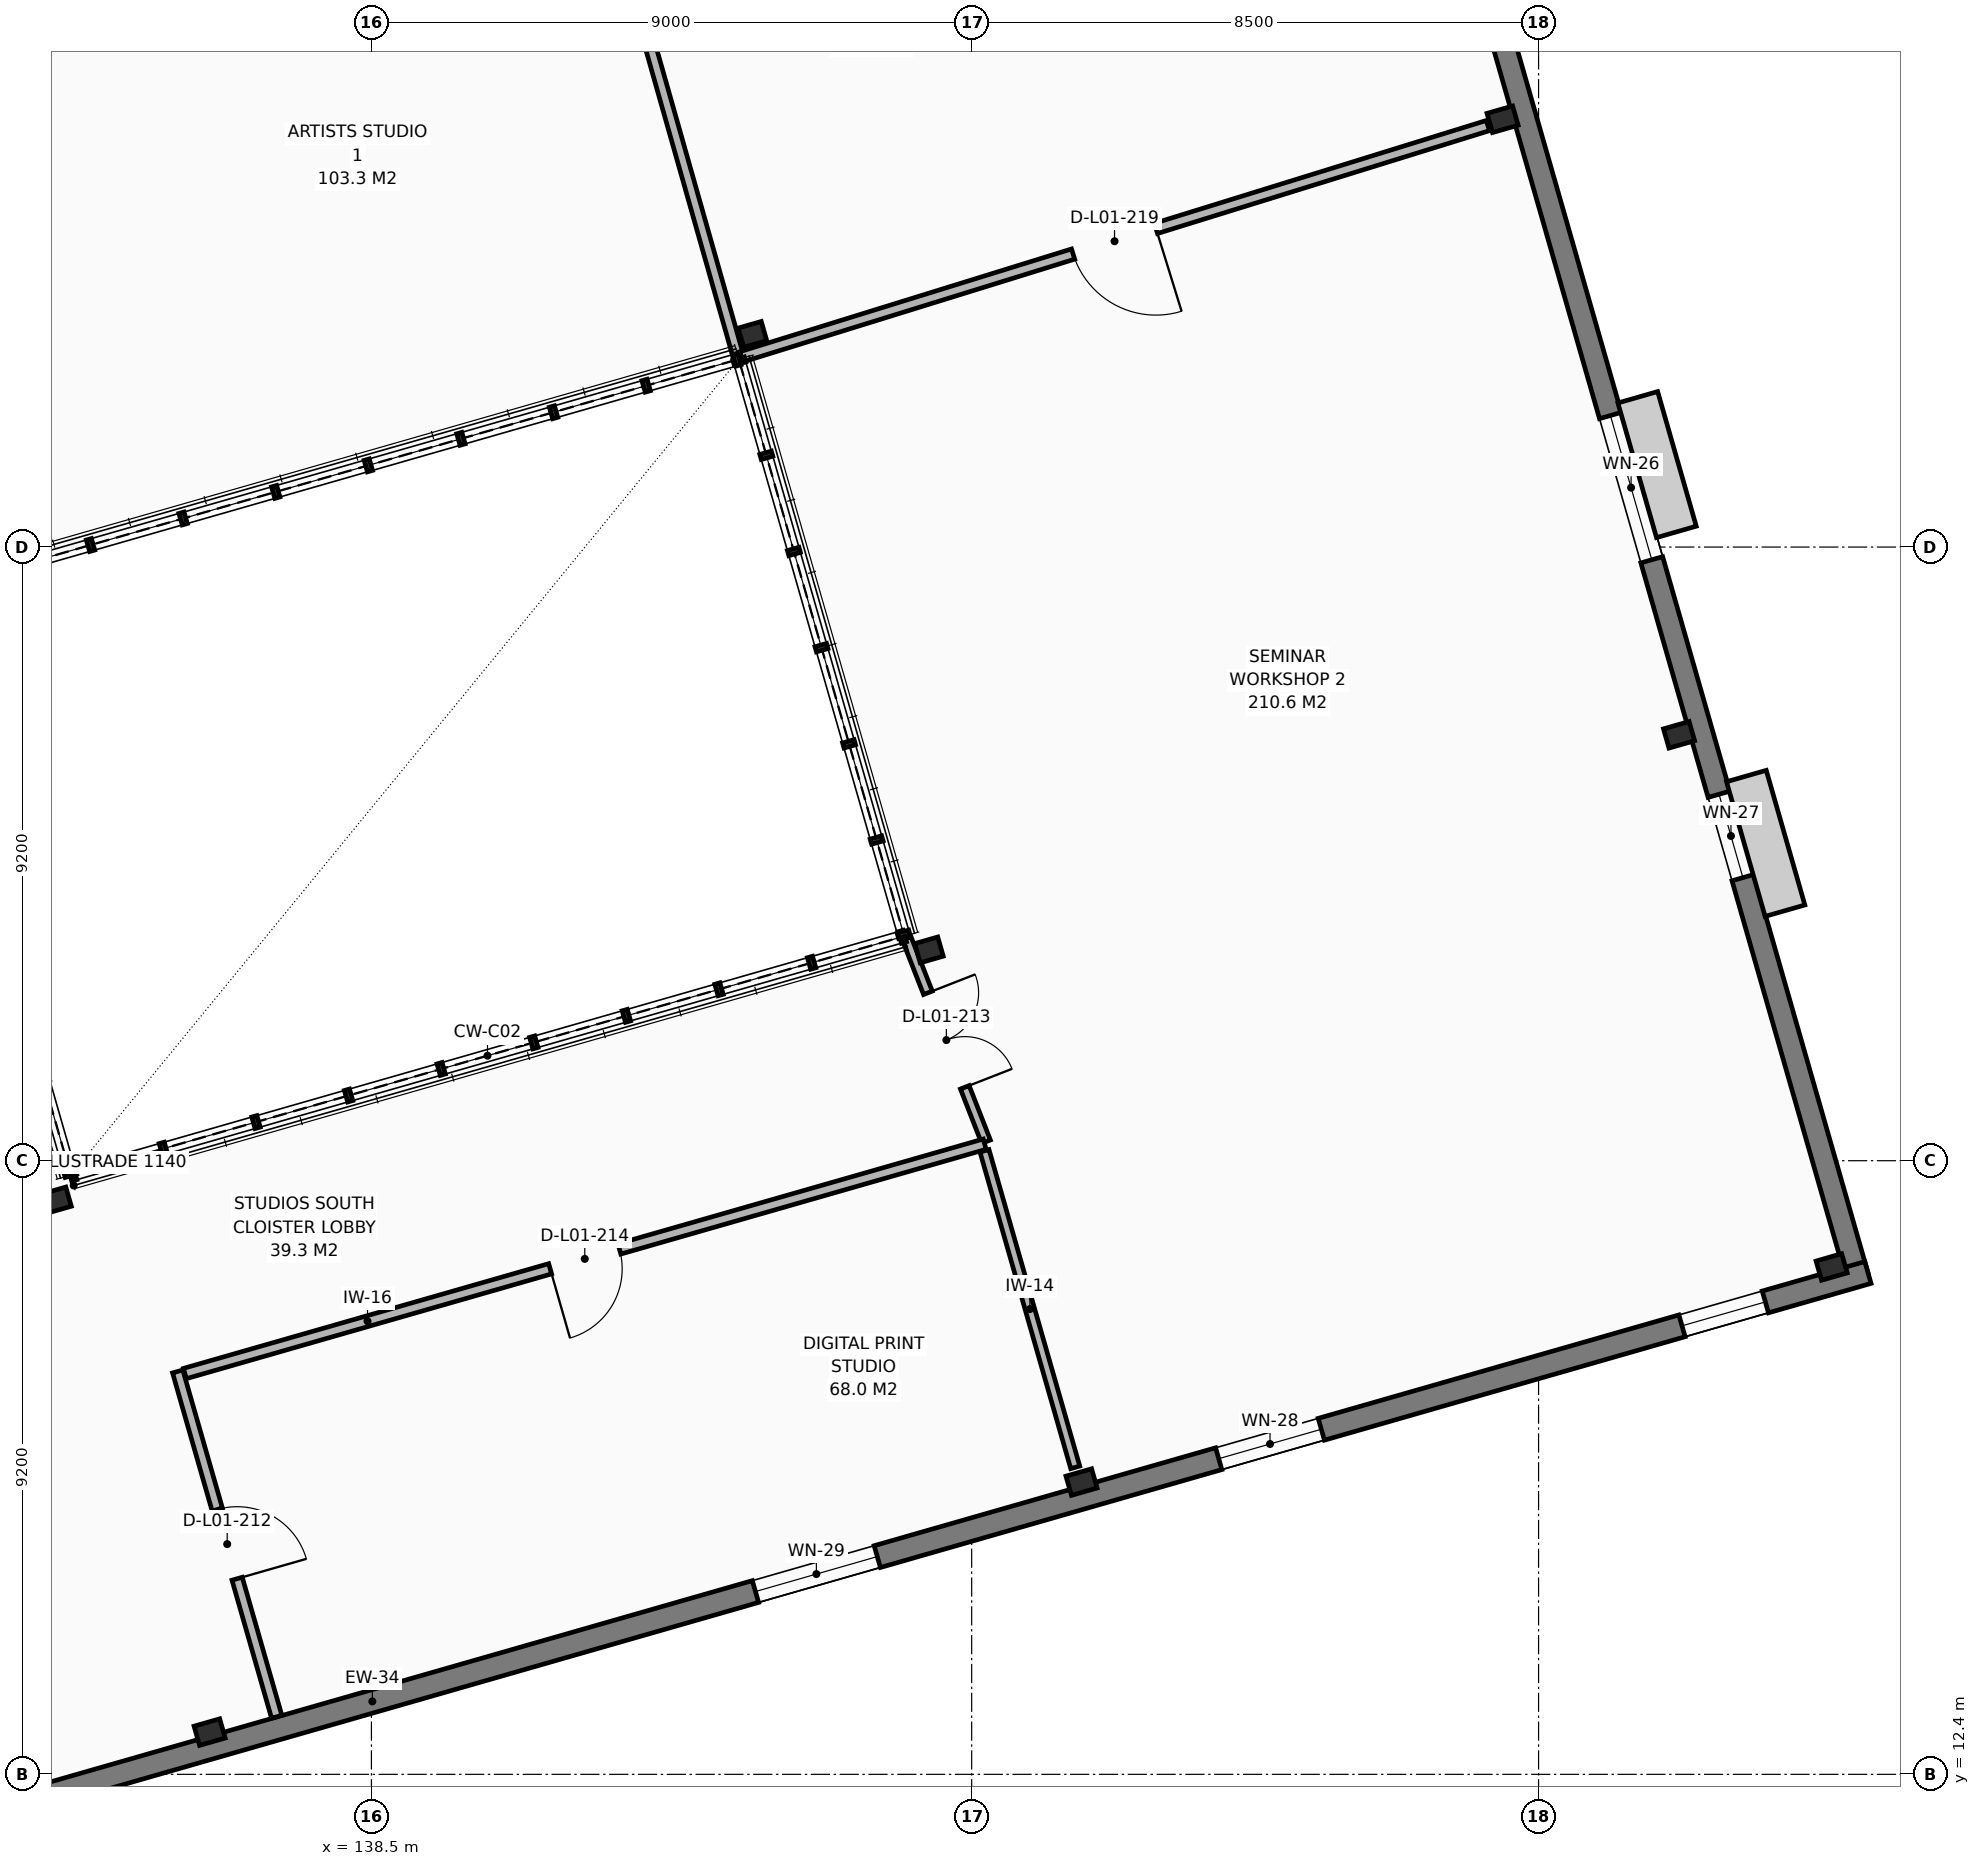
"""IFC4 building model, lengths in metres.
Left out: names, types, materials, properties, quantities, classifications, styles, units other than length and angle.
Written with IfcOpenShell. Run it as: python <this file> out.ifc"""

import sys

from ifc_helpers import new_model, si_unit, direction, frame, frame_2d, origin, origin_2d, place, context, subcontext, project, spatial, rectangle, i_section, extrude, element, fill, save


model = new_model("IFC4")
c1 = context("Model", 3, precision=1e-05, world=origin(), true_north=direction((0.0, 1.0)))
c2 = subcontext(c1, "Body", "Model", "MODEL_VIEW")
j1 = project(units=[si_unit("LENGTHUNIT", "METRE"), si_unit("PLANEANGLEUNIT", "RADIAN")], contexts=[c1])
p1 = place(None, origin())
s1 = spatial("IfcSite", under=j1, at=p1, CompositionType="ELEMENT")
p2 = place(p1, origin())
s2 = spatial("IfcBuilding", under=s1, at=p2, CompositionType="ELEMENT")
p3 = place(p2, frame((0.0, 0.0, 5.1)))
s3 = spatial("IfcBuildingStorey", under=s2, at=p3, CompositionType="ELEMENT", Elevation=5.1)
p4 = place(p3, frame((136.074, 13.033, 0.0), z_axis=(0.0, 0.0, 1.0), x_axis=(0.961261695938, 0.275637355817, 0.0)))
e1 = element("IfcColumn", 1, at=p4, inside=s3, PredefinedType="COLUMN", context=c2, shape_type="SweptSolid", body=[
    extrude(i_section(OverallWidth=0.3, OverallDepth=0.4, WebThickness=0.013, FlangeThickness=0.024, FilletRadius=0.027, at=origin_2d()), origin(), (0.0, 0.0, 1.0), 4.42),
])
p5 = place(p3, frame((133.787, 21.012, 0.0), z_axis=(0.0, 0.0, 1.0), x_axis=(0.961261695938, 0.275637355817, 0.0)))
e2 = element("IfcColumn", 2, at=p5, inside=s3, PredefinedType="COLUMN", context=c2, shape_type="SweptSolid", body=[
    extrude(i_section(OverallWidth=0.3, OverallDepth=0.36, WebThickness=0.012, FlangeThickness=0.022, FilletRadius=0.027, at=origin_2d()), origin(), (0.0, 0.0, 1.0), 4.42),
])
p6 = place(p3, frame((149.147, 16.782, 0.0), z_axis=(0.0, 0.0, 1.0), x_axis=(0.961261695938, 0.275637355817, 0.0)))
e3 = element("IfcColumn", 3, at=p6, inside=s3, PredefinedType="COLUMN", context=c2, shape_type="SweptSolid", body=[
    extrude(i_section(OverallWidth=0.3, OverallDepth=0.4, WebThickness=0.013, FlangeThickness=0.024, FilletRadius=0.027, at=origin_2d()), origin(), (0.0, 0.0, 1.0), 4.42),
])
for number, where, z_axis, x_axis in (
    (4, (146.86, 24.76, 0.0), (0.0, 0.0, 1.0), (0.961, 0.276, 0.0)),
    (5, (144.213, 33.988, 0.0), (0.0, 0.0, 1.0), (0.961, 0.276, 0.0)),
):
    element("IfcColumn", number, at=place(p3, frame(where, z_axis=z_axis, x_axis=x_axis)), inside=s3, PredefinedType="COLUMN", context=c2, shape_type="SweptSolid", body=[
        extrude(i_section(OverallWidth=0.3, OverallDepth=0.36, WebThickness=0.012, FlangeThickness=0.022, FilletRadius=0.027, at=origin_2d()), origin(), (0.0, 0.0, 1.0), 4.42),
    ])
for number, where, z_axis, x_axis in (
    (6, (160.394, 20.007, 0.0), (0.0, 0.0, 1.0), (0.961, 0.276, 0.0)),
    (7, (158.106, 27.985, 0.0), (0.0, 0.0, 1.0), (0.961, 0.276, 0.0)),
    (8, (155.46, 37.213, 0.0), (0.0, 0.0, 1.0), (0.961, 0.276, 0.0)),
):
    element("IfcColumn", number, at=place(p3, frame(where, z_axis=z_axis, x_axis=x_axis)), inside=s3, PredefinedType="COLUMN", context=c2, shape_type="SweptSolid", body=[
        extrude(i_section(OverallWidth=0.3, OverallDepth=0.4, WebThickness=0.013, FlangeThickness=0.024, FilletRadius=0.027, at=origin_2d()), origin(), (0.0, 0.0, 1.0), 4.42),
    ])
p7 = place(p3, frame((120.562, 36.08, 0.0), z_axis=(0.0, 0.0, 1.0), x_axis=(0.96126158877, 0.275637729557, 0.0)))
e9 = element("IfcWall", 9, at=p7, inside=s3, PredefinedType="SOLIDWALL", context=c2, shape_type="SweptSolid", body=[
    extrude(rectangle(XDim=34.189, YDim=0.34, at=frame_2d((17.095, 0.0))), origin(), (0.0, 0.0, 1.0), 4.2),
])
p8 = place(p7, frame((1.6, 0.0, 0.85)))
e10 = element("IfcOpeningElement", 10, at=p8, cuts=e9, PredefinedType="OPENING", context=c2, shape_type="SweptSolid", body=[
    extrude(rectangle(XDim=1.2, YDim=1.4, at=frame_2d((0.6, 0.7))), frame((0.0, 0.18, 0.0), z_axis=(0.0, -1.0, 0.0), x_axis=(1.0, 0.0, 0.0)), (0.0, 0.0, 1.0), 0.36),
])
p9 = place(p7, frame((13.996, 0.0, 0.85)))
e11 = element("IfcOpeningElement", 11, at=p9, cuts=e9, PredefinedType="OPENING", context=c2, shape_type="SweptSolid", body=[
    extrude(rectangle(XDim=1.65, YDim=1.4, at=frame_2d((0.825, 0.7))), frame((0.0, 0.18, 0.0), z_axis=(0.0, -1.0, 0.0), x_axis=(1.0, 0.0, 0.0)), (0.0, 0.0, 1.0), 0.36),
])
p10 = place(p7, frame((26.391, 0.0, 0.85)))
e12 = element("IfcOpeningElement", 12, at=p10, cuts=e9, PredefinedType="OPENING", context=c2, shape_type="SweptSolid", body=[
    extrude(rectangle(XDim=2.05, YDim=1.4, at=frame_2d((1.025, 0.7))), frame((0.0, 0.18, 0.0), z_axis=(0.0, -1.0, 0.0), x_axis=(1.0, 0.0, 0.0)), (0.0, 0.0, 1.0), 0.36),
])
p11 = place(p3, frame((153.379, 45.667, 0.0), z_axis=(0.0, 0.0, 1.0), x_axis=(0.275644006198, -0.961259788947, 0.0)))
e13 = element("IfcWall", 13, at=p11, inside=s3, PredefinedType="SOLIDWALL", context=c2, shape_type="SweptSolid", body=[
    extrude(rectangle(XDim=26.83, YDim=0.34, at=frame_2d((13.415, 0.0))), origin(), (0.0, 0.0, 1.0), 4.2),
])
p12 = place(p11, frame((1.6, 0.0, 0.85)))
e14 = element("IfcOpeningElement", 14, at=p12, cuts=e13, PredefinedType="OPENING", context=c2, shape_type="SweptSolid", body=[
    extrude(rectangle(XDim=1.85, YDim=1.4, at=frame_2d((0.925, 0.7))), frame((0.0, 0.18, 0.0), z_axis=(0.0, -1.0, 0.0), x_axis=(1.0, 0.0, 0.0)), (0.0, 0.0, 1.0), 0.36),
])
p13 = place(p11, frame((13.415, 0.0, 0.85)))
e15 = element("IfcOpeningElement", 15, at=p13, cuts=e13, PredefinedType="OPENING", context=c2, shape_type="SweptSolid", body=[
    extrude(rectangle(XDim=2.25, YDim=1.4, at=frame_2d((1.125, 0.7))), frame((0.0, 0.18, 0.0), z_axis=(0.0, -1.0, 0.0), x_axis=(1.0, 0.0, 0.0)), (0.0, 0.0, 1.0), 0.36),
])
p14 = place(p11, frame((19.323, 0.0, 0.85)))
e16 = element("IfcOpeningElement", 16, at=p14, cuts=e13, PredefinedType="OPENING", context=c2, shape_type="SweptSolid", body=[
    extrude(rectangle(XDim=1.3, YDim=1.6, at=frame_2d((0.65, 0.8))), frame((0.0, 0.18, 0.0), z_axis=(0.0, -1.0, 0.0), x_axis=(1.0, 0.0, 0.0)), (0.0, 0.0, 1.0), 0.36),
])
p15 = place(p3, frame((160.938, 19.924, 0.0), z_axis=(0.0, 0.0, 1.0), x_axis=(-0.961260735733, -0.275640704428, 0.0)))
e17 = element("IfcWall", 17, at=p15, inside=s3, PredefinedType="SOLIDWALL", context=c2, shape_type="SweptSolid", body=[
    extrude(rectangle(XDim=37.83, YDim=0.34, at=frame_2d((18.915, 0.0))), origin(), (0.0, 0.0, 1.0), 4.2),
])
p16 = place(p15, frame((1.6, 0.0, 0.85)))
e18 = element("IfcOpeningElement", 18, at=p16, cuts=e17, PredefinedType="OPENING", context=c2, shape_type="SweptSolid", body=[
    extrude(rectangle(XDim=1.3, YDim=1.6, at=frame_2d((0.65, 0.8))), frame((0.0, 0.18, 0.0), z_axis=(0.0, -1.0, 0.0), x_axis=(1.0, 0.0, 0.0)), (0.0, 0.0, 1.0), 0.36),
])
p17 = place(p15, frame((8.526, 0.0, 0.85)))
e19 = element("IfcOpeningElement", 19, at=p17, cuts=e17, PredefinedType="OPENING", context=c2, shape_type="SweptSolid", body=[
    extrude(rectangle(XDim=1.6, YDim=1.6, at=frame_2d((0.8, 0.8))), frame((0.0, 0.18, 0.0), z_axis=(0.0, -1.0, 0.0), x_axis=(1.0, 0.0, 0.0)), (0.0, 0.0, 1.0), 0.36),
])
p18 = place(p15, frame((15.452, 0.0, 0.85)))
e20 = element("IfcOpeningElement", 20, at=p18, cuts=e17, PredefinedType="OPENING", context=c2, shape_type="SweptSolid", body=[
    extrude(rectangle(XDim=1.9, YDim=1.6, at=frame_2d((0.95, 0.8))), frame((0.0, 0.18, 0.0), z_axis=(0.0, -1.0, 0.0), x_axis=(1.0, 0.0, 0.0)), (0.0, 0.0, 1.0), 0.36),
])
p19 = place(p15, frame((29.304, 0.0, 0.85)))
e21 = element("IfcOpeningElement", 21, at=p19, cuts=e17, PredefinedType="OPENING", context=c2, shape_type="SweptSolid", body=[
    extrude(rectangle(XDim=1.35, YDim=1.5, at=frame_2d((0.675, 0.75))), frame((0.0, 0.18, 0.0), z_axis=(0.0, -1.0, 0.0), x_axis=(1.0, 0.0, 0.0)), (0.0, 0.0, 1.0), 0.36),
])
p20 = place(p3, frame((135.595, 18.441, 0.0), z_axis=(0.0, 0.0, 1.0), x_axis=(0.275636962286, -0.961261808781, 0.0)))
e22 = element("IfcWall", 22, at=p20, inside=s3, PredefinedType="PARTITIONING", context=c2, shape_type="SweptSolid", body=[
    extrude(rectangle(XDim=5.386, YDim=0.16, at=frame_2d((2.693, 0.0))), origin(), (0.0, 0.0, 1.0), 3.69),
])
p21 = place(p20, frame((2.153, 0.0, 0.0)))
e23 = element("IfcOpeningElement", 23, at=p21, cuts=e22, PredefinedType="OPENING", context=c2, shape_type="SweptSolid", body=[
    extrude(rectangle(XDim=1.08, YDim=2.12, at=frame_2d((0.54, 1.06))), frame((0.0, 0.09, 0.0), z_axis=(0.0, -1.0, 0.0), x_axis=(1.0, 0.0, 0.0)), (0.0, 0.0, 1.0), 0.18),
])
p22 = place(p3, frame((146.525, 24.932, 0.0), z_axis=(0.0, 0.0, 1.0), x_axis=(0.363735192139, -0.931502393985, 0.0)))
e24 = element("IfcWall", 24, at=p22, inside=s3, PredefinedType="PARTITIONING", context=c2, shape_type="SweptSolid", body=[
    extrude(rectangle(XDim=3.271, YDim=0.14, at=frame_2d((1.636, 0.0))), origin(), (0.0, 0.0, 1.0), 3.69),
])
p23 = place(p22, frame((0.876, 0.0, 0.0)))
e25 = element("IfcOpeningElement", 25, at=p23, cuts=e24, PredefinedType="OPENING", context=c2, shape_type="SweptSolid", body=[
    extrude(rectangle(XDim=1.52, YDim=2.2, at=frame_2d((0.76, 1.1))), frame((0.0, 0.08, 0.0), z_axis=(0.0, -1.0, 0.0), x_axis=(1.0, 0.0, 0.0)), (0.0, 0.0, 1.0), 0.16),
])
p24 = place(p3, frame((147.695, 21.848, 0.0), z_axis=(0.0, 0.0, 1.0), x_axis=(-0.961263561919, -0.275630848285, 0.0)))
e26 = element("IfcWall", 26, at=p24, inside=s3, PredefinedType="PARTITIONING", context=c2, shape_type="SweptSolid", body=[
    extrude(rectangle(XDim=12.475, YDim=0.16, at=frame_2d((6.237, 0.0))), origin(), (0.0, 0.0, 1.0), 3.74),
])
p25 = place(p24, frame((5.698, 0.0, 0.0)))
e27 = element("IfcOpeningElement", 27, at=p25, cuts=e26, PredefinedType="OPENING", context=c2, shape_type="SweptSolid", body=[
    extrude(rectangle(XDim=1.08, YDim=2.12, at=frame_2d((0.54, 1.06))), frame((0.0, 0.09, 0.0), z_axis=(0.0, -1.0, 0.0), x_axis=(1.0, 0.0, 0.0)), (0.0, 0.0, 1.0), 0.18),
])
p26 = place(p3, frame((141.651, 41.946, 0.0), z_axis=(0.0, 0.0, 1.0), x_axis=(0.272813519346, -0.962066933047, 0.0)))
e28 = element("IfcWall", 28, at=p26, inside=s3, PredefinedType="PARTITIONING", context=c2, shape_type="SweptSolid", body=[
    extrude(rectangle(XDim=8.606, YDim=0.16, at=frame_2d((4.303, 0.0))), origin(), (0.0, 0.0, 1.0), 3.69),
])
p27 = place(p3, frame((155.24, 37.119, 0.0), z_axis=(0.0, 0.0, 1.0), x_axis=(-0.955222404678, -0.295888758828, 0.0)))
e29 = element("IfcWall", 29, at=p27, inside=s3, PredefinedType="PARTITIONING", context=c2, shape_type="SweptSolid", body=[
    extrude(rectangle(XDim=11.72, YDim=0.16, at=frame_2d((5.86, 0.0))), origin(), (0.0, 0.0, 1.0), 3.69),
])
p28 = place(p27, frame((5.21, 0.0, 0.0)))
e30 = element("IfcOpeningElement", 30, at=p28, cuts=e29, PredefinedType="OPENING", context=c2, shape_type="SweptSolid", body=[
    extrude(rectangle(XDim=1.3, YDim=2.15, at=frame_2d((0.65, 1.075))), frame((0.0, 0.09, 0.0), z_axis=(0.0, -1.0, 0.0), x_axis=(1.0, 0.0, 0.0)), (0.0, 0.0, 1.0), 0.18),
])
p29 = place(p3, frame((149.053, 17.002, 0.0), z_axis=(0.0, 0.0, 1.0), x_axis=(-0.275635365707, 0.961262266591, 0.0)))
e31 = element("IfcWall", 31, at=p29, inside=s3, PredefinedType="PARTITIONING", context=c2, shape_type="SweptSolid", body=[
    extrude(rectangle(XDim=4.937, YDim=0.14, at=frame_2d((2.469, 0.0))), origin(), (0.0, 0.0, 1.0), 3.69),
])
p30 = place(p13, origin())
e32 = element("IfcWindow", 32, at=p30, inside=s3, PartitioningType="SINGLE_PANEL", PredefinedType="WINDOW", context=c2, shape_type="SweptSolid", body=[
    extrude(rectangle(XDim=2.25, YDim=1.4, at=frame_2d((1.125, 0.7))), frame((0.0, 0.03, 0.0), z_axis=(0.0, -1.0, 0.0), x_axis=(1.0, 0.0, 0.0)), (0.0, 0.0, 1.0), 0.06),
])
fill(e15, e32)
p31 = place(p14, origin())
e33 = element("IfcWindow", 33, at=p31, inside=s3, PartitioningType="SINGLE_PANEL", PredefinedType="WINDOW", context=c2, shape_type="SweptSolid", body=[
    extrude(rectangle(XDim=1.3, YDim=1.6, at=frame_2d((0.65, 0.8))), frame((0.0, 0.03, 0.0), z_axis=(0.0, -1.0, 0.0), x_axis=(1.0, 0.0, 0.0)), (0.0, 0.0, 1.0), 0.06),
])
fill(e16, e33)
p32 = place(p16, origin())
e34 = element("IfcWindow", 34, at=p32, inside=s3, PartitioningType="SINGLE_PANEL", PredefinedType="WINDOW", context=c2, shape_type="SweptSolid", body=[
    extrude(rectangle(XDim=1.3, YDim=1.6, at=frame_2d((0.65, 0.8))), frame((0.0, 0.03, 0.0), z_axis=(0.0, -1.0, 0.0), x_axis=(1.0, 0.0, 0.0)), (0.0, 0.0, 1.0), 0.06),
])
fill(e18, e34)
p33 = place(p17, origin())
e35 = element("IfcWindow", 35, at=p33, inside=s3, PartitioningType="SINGLE_PANEL", PredefinedType="WINDOW", context=c2, shape_type="SweptSolid", body=[
    extrude(rectangle(XDim=1.6, YDim=1.6, at=frame_2d((0.8, 0.8))), frame((0.0, 0.03, 0.0), z_axis=(0.0, -1.0, 0.0), x_axis=(1.0, 0.0, 0.0)), (0.0, 0.0, 1.0), 0.06),
])
fill(e19, e35)
p34 = place(p18, origin())
e36 = element("IfcWindow", 36, at=p34, inside=s3, PartitioningType="SINGLE_PANEL", PredefinedType="WINDOW", context=c2, shape_type="SweptSolid", body=[
    extrude(rectangle(XDim=1.9, YDim=1.6, at=frame_2d((0.95, 0.8))), frame((0.0, 0.03, 0.0), z_axis=(0.0, -1.0, 0.0), x_axis=(1.0, 0.0, 0.0)), (0.0, 0.0, 1.0), 0.06),
])
fill(e20, e36)
p35 = place(p21, origin())
e37 = element("IfcDoor", 37, at=p35, inside=s3, OperationType="SINGLE_SWING_RIGHT", PredefinedType="DOOR", context=c2, shape_type="SweptSolid", body=[
    extrude(rectangle(XDim=1.08, YDim=2.12, at=frame_2d((0.54, 1.06))), frame((0.0, 0.025, 0.0), z_axis=(0.0, -1.0, 0.0), x_axis=(1.0, 0.0, 0.0)), (0.0, 0.0, 1.0), 0.05),
])
fill(e23, e37)
p36 = place(p23, origin())
e38 = element("IfcDoor", 38, at=p36, inside=s3, OperationType="DOUBLE_DOOR_SINGLE_SWING", PredefinedType="DOOR", context=c2, shape_type="SweptSolid", body=[
    extrude(rectangle(XDim=1.52, YDim=2.2, at=frame_2d((0.76, 1.1))), frame((0.0, 0.025, 0.0), z_axis=(0.0, -1.0, 0.0), x_axis=(1.0, 0.0, 0.0)), (0.0, 0.0, 1.0), 0.05),
])
fill(e25, e38)
p37 = place(p25, origin())
e39 = element("IfcDoor", 39, at=p37, inside=s3, OperationType="SINGLE_SWING_RIGHT", PredefinedType="DOOR", context=c2, shape_type="SweptSolid", body=[
    extrude(rectangle(XDim=1.08, YDim=2.12, at=frame_2d((0.54, 1.06))), frame((0.0, 0.025, 0.0), z_axis=(0.0, -1.0, 0.0), x_axis=(1.0, 0.0, 0.0)), (0.0, 0.0, 1.0), 0.05),
])
fill(e27, e39)
p38 = place(p28, origin())
e40 = element("IfcDoor", 40, at=p38, inside=s3, OperationType="SINGLE_SWING_LEFT", PredefinedType="DOOR", context=c2, shape_type="SweptSolid", body=[
    extrude(rectangle(XDim=1.3, YDim=2.15, at=frame_2d((0.65, 1.075))), frame((0.0, 0.025, 0.0), z_axis=(0.0, -1.0, 0.0), x_axis=(1.0, 0.0, 0.0)), (0.0, 0.0, 1.0), 0.05),
])
fill(e30, e40)
save(model, sys.argv[1])
